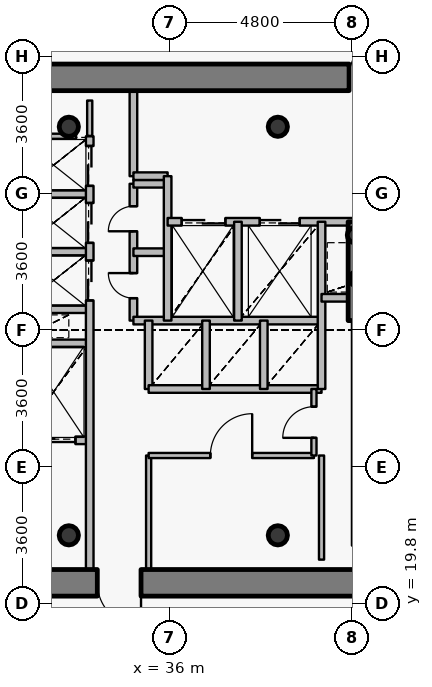
"""IFC4 building model, lengths in metres.
Left out: names, types, materials, properties, quantities, classifications, styles, units other than length and angle.
Written with IfcOpenShell. Run it as: python <this file> out.ifc"""

import sys

from ifc_helpers import new_model, si_unit, direction, frame, frame_2d, origin, origin_2d, place, context, subcontext, project, spatial, rectangle, hollow_circle, extrude, source, transform, mapped, element, fill, save


model = new_model("IFC4")
c1 = context("Model", 3, precision=1e-05, world=origin(), true_north=direction((0.0, 1.0)))
c2 = subcontext(c1, "Body", "Model", "MODEL_VIEW")
j1 = project(units=[si_unit("LENGTHUNIT", "METRE"), si_unit("PLANEANGLEUNIT", "RADIAN")], contexts=[c1])
p1 = place(None, origin())
s1 = spatial("IfcSite", under=j1, at=p1, CompositionType="ELEMENT")
p2 = place(p1, origin())
s2 = spatial("IfcBuilding", under=s1, at=p2, CompositionType="ELEMENT")
p3 = place(p2, frame((0.0, 0.0, 210.3)))
s3 = spatial("IfcBuildingStorey", under=s2, at=p3, CompositionType="ELEMENT", Elevation=210.3)
for number, where, z_axis, x_axis in (
    (1, (33.35, 21.6, 0.0), (0.0, 0.0, 1.0), (1.0, 0.0, 0.0)),
    (2, (38.85, 21.6, 0.0), (0.0, 0.0, 1.0), (1.0, 0.0, 0.0)),
    (3, (38.85, 32.35, 0.0), (0.0, 0.0, 1.0), (1.0, 0.0, 0.0)),
    (4, (33.35, 32.35, 0.0), (0.0, 0.0, 1.0), (1.0, 0.0, 0.0)),
):
    element("IfcColumn", number, at=place(p3, frame(where, z_axis=z_axis, x_axis=x_axis)), inside=s3, PredefinedType="COLUMN", context=c2, shape_type="SweptSolid", body=[
        extrude(hollow_circle(Radius=0.254, WallThickness=0.02, at=origin_2d()), origin(), (0.0, 0.0, 1.0), 3.75),
    ])
for number, where, z_axis, x_axis in (
    (5, (40.95, 28.35, 0.0), (0.0, 0.0, 1.0), (1.0, 0.0, 0.0)),
    (6, (40.88, 29.5, 0.0), (0.0, 0.0, 1.0), (1.0, 0.0, 0.0)),
):
    element("IfcColumn", number, at=place(p3, frame(where, z_axis=z_axis, x_axis=x_axis)), inside=s3, PredefinedType="COLUMN", context=c2, shape_type="SweptSolid", body=[
        extrude(hollow_circle(Radius=0.203, WallThickness=0.016, at=origin_2d()), origin(), (0.0, 0.0, 1.0), 3.75),
    ])
p4 = place(p3, frame((27.05, 33.65, 0.0), z_axis=(0.0, 0.0, 1.0), x_axis=(1.0, 0.0, 0.0)))
e7 = element("IfcWall", 7, at=p4, inside=s3, PredefinedType="SHEAR", context=c2, shape_type="SweptSolid", body=[
    extrude(rectangle(XDim=17.9, YDim=0.7, at=frame_2d((8.95, 0.0))), origin(), (0.0, 0.0, 1.0), 3.05),
])
p5 = place(p4, frame((13.675, 0.0, 0.0)))
e8 = element("IfcOpeningElement", 8, at=p5, cuts=e7, PredefinedType="OPENING", context=c2, shape_type="SweptSolid", body=[
    extrude(rectangle(XDim=1.15, YDim=2.15, at=origin_2d()), frame((0.575, 0.36, 1.075), z_axis=(0.0, -1.0, 0.0), x_axis=(1.0, 0.0, 0.0)), (0.0, 0.0, 1.0), 0.72),
])
p6 = place(p3, frame((44.95, 20.35, 0.0), z_axis=(0.0, 0.0, 1.0), x_axis=(-1.0, 0.0, 0.0)))
e9 = element("IfcWall", 9, at=p6, inside=s3, PredefinedType="SHEAR", context=c2, shape_type="SweptSolid", body=[
    extrude(rectangle(XDim=17.9, YDim=0.7, at=frame_2d((8.95, 0.0))), origin(), (0.0, 0.0, 1.0), 3.05),
])
p7 = place(p6, frame((9.7, 0.0, 0.0)))
e10 = element("IfcOpeningElement", 10, at=p7, cuts=e9, PredefinedType="OPENING", context=c2, shape_type="SweptSolid", body=[
    extrude(rectangle(XDim=1.15, YDim=2.15, at=origin_2d()), frame((0.575, 0.36, 1.075), z_axis=(0.0, -1.0, 0.0), x_axis=(1.0, 0.0, 0.0)), (0.0, 0.0, 1.0), 0.72),
])
p8 = place(p3, frame((40.9, 27.25, 0.0), z_axis=(0.0, 0.0, 1.0), x_axis=(0.0, 1.0, 0.0)))
e11 = element("IfcWall", 11, at=p8, inside=s3, PredefinedType="SHEAR", context=c2, shape_type="SweptSolid", body=[
    extrude(rectangle(XDim=2.6, YDim=0.4, at=frame_2d((1.3, 0.0))), origin(), (0.0, 0.0, 1.0), 3.1),
])
p9 = place(p3, frame((32.0, 24.1, 0.0), z_axis=(0.0, 0.0, 1.0), x_axis=(1.0, 0.0, 0.0)))
e12 = element("IfcWall", 12, at=p9, inside=s3, PredefinedType="PARTITIONING", context=c2, shape_type="SweptSolid", body=[
    extrude(rectangle(XDim=1.9, YDim=0.2, at=frame_2d((0.95, 0.0))), origin(), (0.0, 0.0, 1.0), 3.085),
])
p10 = place(p9, frame((0.375, 0.0, 0.0)))
e13 = element("IfcOpeningElement", 13, at=p10, cuts=e12, PredefinedType="OPENING", context=c2, shape_type="SweptSolid", body=[
    extrude(rectangle(XDim=1.15, YDim=2.15, at=origin_2d()), frame((0.575, 0.11, 1.075), z_axis=(0.0, -1.0, 0.0), x_axis=(1.0, 0.0, 0.0)), (0.0, 0.0, 1.0), 0.22),
])
for number, where, z_axis, x_axis in (
    (14, (32.0, 26.65, 0.0), (0.0, 0.0, 1.0), (1.0, 0.0, 0.0)),
    (15, (32.0, 27.55, 0.0), (0.0, 0.0, 1.0), (1.0, 0.0, 0.0)),
    (16, (32.0, 29.06, 0.0), (0.0, 0.0, 1.0), (1.0, 0.0, 0.0)),
    (17, (32.0, 30.58, 0.0), (0.0, 0.0, 1.0), (1.0, 0.0, 0.0)),
):
    element("IfcWall", number, at=place(p3, frame(where, z_axis=z_axis, x_axis=x_axis)), inside=s3, PredefinedType="PARTITIONING", context=c2, shape_type="SweptSolid", body=[
        extrude(rectangle(XDim=1.9, YDim=0.2, at=frame_2d((0.95, 0.0))), origin(), (0.0, 0.0, 1.0), 3.085),
    ])
p11 = place(p3, frame((33.9, 20.7, 0.0), z_axis=(0.0, 0.0, 1.0), x_axis=(0.0, 1.0, 0.0)))
e18 = element("IfcWall", 18, at=p11, inside=s3, PredefinedType="PARTITIONING", context=c2, shape_type="SweptSolid", body=[
    extrude(rectangle(XDim=11.4, YDim=0.2, at=frame_2d((5.7, 0.0))), origin(), (0.0, 0.0, 1.0), 3.085),
])
p12 = place(p11, frame((7.08, 0.0, 0.0)))
e19 = element("IfcOpeningElement", 19, at=p12, cuts=e18, PredefinedType="OPENING", context=c2, shape_type="SweptSolid", body=[
    extrude(rectangle(XDim=1.05, YDim=2.15, at=origin_2d()), frame((0.525, 0.11, 1.075), z_axis=(0.0, -1.0, 0.0), x_axis=(1.0, 0.0, 0.0)), (0.0, 0.0, 1.0), 0.22),
])
p13 = place(p11, frame((8.595, 0.0, 0.0)))
e20 = element("IfcOpeningElement", 20, at=p13, cuts=e18, PredefinedType="OPENING", context=c2, shape_type="SweptSolid", body=[
    extrude(rectangle(XDim=1.05, YDim=2.15, at=origin_2d()), frame((0.525, 0.11, 1.075), z_axis=(0.0, -1.0, 0.0), x_axis=(1.0, 0.0, 0.0)), (0.0, 0.0, 1.0), 0.22),
])
p14 = place(p11, frame((10.095, 0.0, 0.0)))
e21 = element("IfcOpeningElement", 21, at=p14, cuts=e18, PredefinedType="OPENING", context=c2, shape_type="SweptSolid", body=[
    extrude(rectangle(XDim=1.05, YDim=2.15, at=origin_2d()), frame((0.525, 0.11, 1.075), z_axis=(0.0, -1.0, 0.0), x_axis=(1.0, 0.0, 0.0)), (0.0, 0.0, 1.0), 0.22),
])
p15 = place(p3, frame((35.05, 27.25, 0.0), z_axis=(0.0, 0.0, 1.0), x_axis=(0.0, 1.0, 0.0)))
e22 = element("IfcWall", 22, at=p15, inside=s3, PredefinedType="PARTITIONING", context=c2, shape_type="SweptSolid", body=[
    extrude(rectangle(XDim=3.6, YDim=0.2, at=frame_2d((1.8, 0.0))), origin(), (0.0, 0.0, 1.0), 3.5),
])
p16 = place(p15, frame((0.59, 0.0, 0.0)))
e23 = element("IfcOpeningElement", 23, at=p16, cuts=e22, PredefinedType="OPENING", context=c2, shape_type="SweptSolid", body=[
    extrude(rectangle(XDim=0.66, YDim=2.05, at=origin_2d()), frame((0.33, 0.11, 1.025), z_axis=(0.0, -1.0, 0.0), x_axis=(1.0, 0.0, 0.0)), (0.0, 0.0, 1.0), 0.22),
])
p17 = place(p15, frame((2.35, 0.0, 0.0)))
e24 = element("IfcOpeningElement", 24, at=p17, cuts=e22, PredefinedType="OPENING", context=c2, shape_type="SweptSolid", body=[
    extrude(rectangle(XDim=0.66, YDim=2.05, at=origin_2d()), frame((0.33, 0.11, 1.025), z_axis=(0.0, -1.0, 0.0), x_axis=(1.0, 0.0, 0.0)), (0.0, 0.0, 1.0), 0.22),
])
p18 = place(p3, frame((35.05, 27.25, 0.0), z_axis=(0.0, 0.0, 1.0), x_axis=(1.0, 0.0, 0.0)))
e25 = element("IfcWall", 25, at=p18, inside=s3, PredefinedType="PARTITIONING", context=c2, shape_type="SweptSolid", body=[
    extrude(rectangle(XDim=4.95, YDim=0.2, at=frame_2d((2.475, 0.0))), origin(), (0.0, 0.0, 1.0), 3.085),
])
for number, where, z_axis, x_axis in (
    (26, (35.05, 29.05, 0.0), (0.0, 0.0, 1.0), (1.0, 0.0, 0.0)),
    (27, (35.05, 30.85, 0.0), (0.0, 0.0, 1.0), (1.0, 0.0, 0.0)),
):
    element("IfcWall", number, at=place(p3, frame(where, z_axis=z_axis, x_axis=x_axis)), inside=s3, PredefinedType="PARTITIONING", context=c2, shape_type="SweptSolid", body=[
        extrude(rectangle(XDim=0.9, YDim=0.2, at=frame_2d((0.45, 0.0))), origin(), (0.0, 0.0, 1.0), 3.5),
    ])
p19 = place(p3, frame((35.05, 31.05, 0.0), z_axis=(0.0, 0.0, 1.0), x_axis=(0.0, 1.0, 0.0)))
e28 = element("IfcWall", 28, at=p19, inside=s3, PredefinedType="PARTITIONING", context=c2, shape_type="SweptSolid", body=[
    extrude(rectangle(XDim=2.25, YDim=0.2, at=frame_2d((1.125, 0.0))), origin(), (0.0, 0.0, 1.0), 3.085),
])
p20 = place(p3, frame((35.05, 31.05, 0.0), z_axis=(0.0, 0.0, 1.0), x_axis=(1.0, 0.0, 0.0)))
e29 = element("IfcWall", 29, at=p20, inside=s3, PredefinedType="PARTITIONING", context=c2, shape_type="SweptSolid", body=[
    extrude(rectangle(XDim=0.9, YDim=0.2, at=frame_2d((0.45, 0.0))), origin(), (0.0, 0.0, 1.0), 3.5),
])
p21 = place(p3, frame((35.45, 20.7, 0.0), z_axis=(0.0, 0.0, 1.0), x_axis=(0.0, 1.0, 0.0)))
e30 = element("IfcWall", 30, at=p21, inside=s3, PredefinedType="PARTITIONING", context=c2, shape_type="SweptSolid", body=[
    extrude(rectangle(XDim=3.0, YDim=0.135, at=frame_2d((1.5, 0.0))), origin(), (0.0, 0.0, 1.0), 3.085),
])
p22 = place(p3, frame((35.45, 23.7, 0.0), z_axis=(0.0, 0.0, 1.0), x_axis=(1.0, 0.0, 0.0)))
e31 = element("IfcWall", 31, at=p22, inside=s3, PredefinedType="PARTITIONING", context=c2, shape_type="SweptSolid", body=[
    extrude(rectangle(XDim=4.35, YDim=0.135, at=frame_2d((2.175, 0.0))), origin(), (0.0, 0.0, 1.0), 3.085),
])
p23 = place(p22, frame((1.625, 0.0, 0.0)))
e32 = element("IfcOpeningElement", 32, at=p23, cuts=e31, PredefinedType="OPENING", context=c2, shape_type="SweptSolid", body=[
    extrude(rectangle(XDim=1.1, YDim=2.15, at=origin_2d()), frame((0.55, 0.078, 1.075), z_axis=(0.0, -1.0, 0.0), x_axis=(1.0, 0.0, 0.0)), (0.0, 0.0, 1.0), 0.155),
])
p24 = place(p3, frame((35.45, 25.45, 0.0), z_axis=(0.0, 0.0, 1.0), x_axis=(0.0, 1.0, 0.0)))
e33 = element("IfcWall", 33, at=p24, inside=s3, PredefinedType="PARTITIONING", context=c2, shape_type="SweptSolid", body=[
    extrude(rectangle(XDim=1.8, YDim=0.2, at=frame_2d((0.9, 0.0))), origin(), (0.0, 0.0, 1.0), 3.5),
])
p25 = place(p3, frame((35.45, 25.45, 0.0), z_axis=(0.0, 0.0, 1.0), x_axis=(1.0, 0.0, 0.0)))
e34 = element("IfcWall", 34, at=p25, inside=s3, PredefinedType="PARTITIONING", context=c2, shape_type="SweptSolid", body=[
    extrude(rectangle(XDim=4.55, YDim=0.2, at=frame_2d((2.275, 0.0))), origin(), (0.0, 0.0, 1.0), 3.085),
])
p26 = place(p3, frame((35.95, 27.25, 0.0), z_axis=(0.0, 0.0, 1.0), x_axis=(0.0, 1.0, 0.0)))
e35 = element("IfcWall", 35, at=p26, inside=s3, PredefinedType="PARTITIONING", context=c2, shape_type="SweptSolid", body=[
    extrude(rectangle(XDim=3.8, YDim=0.2, at=frame_2d((1.9, 0.0))), origin(), (0.0, 0.0, 1.0), 3.5),
])
p27 = place(p3, frame((35.95, 29.85, 0.0), z_axis=(0.0, 0.0, 1.0), x_axis=(1.0, 0.0, 0.0)))
e36 = element("IfcWall", 36, at=p27, inside=s3, PredefinedType="PARTITIONING", context=c2, shape_type="SweptSolid", body=[
    extrude(rectangle(XDim=8.49, YDim=0.2, at=frame_2d((4.245, 0.0))), origin(), (0.0, 0.0, 1.0), 3.085),
])
p28 = place(p27, frame((6.1, 0.0, 0.0)))
e37 = element("IfcOpeningElement", 37, at=p28, cuts=e36, PredefinedType="OPENING", context=c2, shape_type="SweptSolid", body=[
    extrude(rectangle(XDim=1.2, YDim=2.15, at=origin_2d()), frame((0.6, 0.11, 1.075), z_axis=(0.0, -1.0, 0.0), x_axis=(1.0, 0.0, 0.0)), (0.0, 0.0, 1.0), 0.22),
])
p29 = place(p27, frame((0.37, 0.0, 0.0)))
e38 = element("IfcOpeningElement", 38, at=p29, cuts=e36, PredefinedType="OPENING", context=c2, shape_type="SweptSolid", body=[
    extrude(rectangle(XDim=1.15, YDim=2.15, at=origin_2d()), frame((0.575, 0.11, 1.075), z_axis=(0.0, -1.0, 0.0), x_axis=(1.0, 0.0, 0.0)), (0.0, 0.0, 1.0), 0.22),
])
p30 = place(p27, frame((2.425, 0.0, 0.0)))
e39 = element("IfcOpeningElement", 39, at=p30, cuts=e36, PredefinedType="OPENING", context=c2, shape_type="SweptSolid", body=[
    extrude(rectangle(XDim=1.05, YDim=2.15, at=origin_2d()), frame((0.525, 0.11, 1.075), z_axis=(0.0, -1.0, 0.0), x_axis=(1.0, 0.0, 0.0)), (0.0, 0.0, 1.0), 0.22),
])
p31 = place(p3, frame((36.96, 25.45, 0.0), z_axis=(0.0, 0.0, 1.0), x_axis=(0.0, 1.0, 0.0)))
e40 = element("IfcWall", 40, at=p31, inside=s3, PredefinedType="PARTITIONING", context=c2, shape_type="SweptSolid", body=[
    extrude(rectangle(XDim=1.8, YDim=0.2, at=frame_2d((0.9, 0.0))), origin(), (0.0, 0.0, 1.0), 3.5),
])
p32 = place(p3, frame((37.8, 27.25, 0.0), z_axis=(0.0, 0.0, 1.0), x_axis=(0.0, 1.0, 0.0)))
e41 = element("IfcWall", 41, at=p32, inside=s3, PredefinedType="PARTITIONING", context=c2, shape_type="SweptSolid", body=[
    extrude(rectangle(XDim=2.6, YDim=0.2, at=frame_2d((1.3, 0.0))), origin(), (0.0, 0.0, 1.0), 3.5),
])
p33 = place(p3, frame((38.48, 25.45, 0.0), z_axis=(0.0, 0.0, 1.0), x_axis=(0.0, 1.0, 0.0)))
e42 = element("IfcWall", 42, at=p33, inside=s3, PredefinedType="PARTITIONING", context=c2, shape_type="SweptSolid", body=[
    extrude(rectangle(XDim=1.8, YDim=0.2, at=frame_2d((0.9, 0.0))), origin(), (0.0, 0.0, 1.0), 3.5),
])
p34 = place(p3, frame((39.8, 23.7, 0.0), z_axis=(0.0, 0.0, 1.0), x_axis=(0.0, 1.0, 0.0)))
e43 = element("IfcWall", 43, at=p34, inside=s3, PredefinedType="PARTITIONING", context=c2, shape_type="SweptSolid", body=[
    extrude(rectangle(XDim=1.75, YDim=0.135, at=frame_2d((0.875, 0.0))), origin(), (0.0, 0.0, 1.0), 3.5),
])
p35 = place(p34, frame((0.465, 0.0, 0.0)))
e44 = element("IfcOpeningElement", 44, at=p35, cuts=e43, PredefinedType="OPENING", context=c2, shape_type="SweptSolid", body=[
    extrude(rectangle(XDim=0.82, YDim=2.1, at=origin_2d()), frame((0.41, 0.078, 1.05), z_axis=(0.0, -1.0, 0.0), x_axis=(1.0, 0.0, 0.0)), (0.0, 0.0, 1.0), 0.155),
])
p36 = place(p3, frame((40.0, 25.45, 0.0), z_axis=(0.0, 0.0, 1.0), x_axis=(0.0, 1.0, 0.0)))
e45 = element("IfcWall", 45, at=p36, inside=s3, PredefinedType="PARTITIONING", context=c2, shape_type="SweptSolid", body=[
    extrude(rectangle(XDim=4.4, YDim=0.2, at=frame_2d((2.2, 0.0))), origin(), (0.0, 0.0, 1.0), 3.5),
])
p37 = place(p3, frame((40.0, 27.85, 0.0), z_axis=(0.0, 0.0, 1.0), x_axis=(1.0, 0.0, 0.0)))
e46 = element("IfcWall", 46, at=p37, inside=s3, PredefinedType="PARTITIONING", context=c2, shape_type="SweptSolid", body=[
    extrude(rectangle(XDim=0.9, YDim=0.2, at=frame_2d((0.45, 0.0))), origin(), (0.0, 0.0, 1.0), 3.5),
])
p38 = place(p3, frame((40.9, 21.33, 0.0), z_axis=(0.0, 0.0, 1.0), x_axis=(0.0, 1.0, 0.0)))
e47 = element("IfcWall", 47, at=p38, inside=s3, PredefinedType="PARTITIONING", context=c2, shape_type="SweptSolid", body=[
    extrude(rectangle(XDim=5.91, YDim=0.2, at=frame_2d((2.955, 0.0))), origin(), (0.0, 0.0, 1.0), 3.035),
])
p39 = place(p3, frame((32.36, 32.1, 0.0), z_axis=(0.0, 0.0, 1.0), x_axis=(1.0, 0.0, 0.0)))
e48 = element("IfcWall", 48, at=p39, inside=s3, PredefinedType="PARTITIONING", context=c2, shape_type="SweptSolid", body=[
    extrude(rectangle(XDim=1.18, YDim=0.135, at=frame_2d((0.59, 0.0))), origin(), (0.0, 0.0, 1.0), 3.085),
])
p40 = place(p3, frame((40.0, 23.7, 0.0), z_axis=(0.0, 0.0, 1.0), x_axis=(0.0, -1.0, 0.0)))
e49 = element("IfcWall", 49, at=p40, inside=s3, PredefinedType="PARTITIONING", context=c2, shape_type="SweptSolid", body=[
    extrude(rectangle(XDim=2.74, YDim=0.135, at=frame_2d((1.37, 0.0))), origin(), (0.0, 0.0, 1.0), 3.035),
])
p41 = place(p3, frame((33.9, 32.11, 0.0), z_axis=(0.0, 0.0, 1.0), x_axis=(0.0, 1.0, 0.0)))
e50 = element("IfcWall", 50, at=p41, inside=s3, PredefinedType="PARTITIONING", context=c2, shape_type="SweptSolid", body=[
    extrude(rectangle(XDim=0.93, YDim=0.135, at=frame_2d((0.465, 0.0))), origin(), (0.0, 0.0, 1.0), 3.085),
])
m1 = source(origin(), c2, "Body", "SweptSolid", [
    extrude(rectangle(XDim=1.15, YDim=2.15, at=origin_2d()), frame((0.575, 0.025, 1.075), z_axis=(0.0, -1.0, 0.0), x_axis=(1.0, 0.0, 0.0)), (0.0, 0.0, 1.0), 0.05),
])
p42 = place(p5, origin())
e51 = element("IfcDoor", 51, at=p42, inside=s3, OperationType="SINGLE_SWING_RIGHT", PredefinedType="DOOR", context=c2, shape_type="MappedRepresentation", body=[
    mapped(m1, transform((0.0, 0.0, 0.0), x_axis=(1.0, 0.0, 0.0), y_axis=(0.0, 1.0, 0.0), z_axis=(0.0, 0.0, 1.0), scale=1.0)),
])
fill(e8, e51)
p43 = place(p7, origin())
e52 = element("IfcDoor", 52, at=p43, inside=s3, OperationType="SINGLE_SWING_LEFT", PredefinedType="DOOR", context=c2, shape_type="MappedRepresentation", body=[
    mapped(m1, transform((0.0, 0.0, 0.0), x_axis=(1.0, 0.0, 0.0), y_axis=(0.0, 1.0, 0.0), z_axis=(0.0, 0.0, 1.0), scale=1.0)),
])
fill(e10, e52)
m2 = source(origin(), c2, "Body", "SweptSolid", [
    extrude(rectangle(XDim=1.15, YDim=2.15, at=origin_2d()), frame((0.575, 0.025, 1.075), z_axis=(0.0, -1.0, 0.0), x_axis=(1.0, 0.0, 0.0)), (0.0, 0.0, 1.0), 0.05),
])
p44 = place(p29, origin())
e53 = element("IfcDoor", 53, at=p44, inside=s3, OperationType="DOUBLE_DOOR_SLIDING", PredefinedType="USERDEFINED", context=c2, shape_type="MappedRepresentation", body=[
    mapped(m2, transform((0.0, 0.0, 0.0), x_axis=(1.0, 0.0, 0.0), y_axis=(0.0, 1.0, 0.0), z_axis=(0.0, 0.0, 1.0), scale=1.0)),
])
fill(e38, e53)
p45 = place(p10, origin())
e54 = element("IfcDoor", 54, at=p45, inside=s3, OperationType="DOUBLE_DOOR_SLIDING", PredefinedType="USERDEFINED", context=c2, shape_type="MappedRepresentation", body=[
    mapped(m2, transform((0.0, 0.0, 0.0), x_axis=(1.0, 0.0, 0.0), y_axis=(0.0, 1.0, 0.0), z_axis=(0.0, 0.0, 1.0), scale=1.0)),
])
fill(e13, e54)
m3 = source(origin(), c2, "Body", "SweptSolid", [
    extrude(rectangle(XDim=1.05, YDim=2.15, at=origin_2d()), frame((0.525, 0.025, 1.075), z_axis=(0.0, -1.0, 0.0), x_axis=(1.0, 0.0, 0.0)), (0.0, 0.0, 1.0), 0.05),
])
p46 = place(p30, origin())
e55 = element("IfcDoor", 55, at=p46, inside=s3, OperationType="DOUBLE_DOOR_SLIDING", PredefinedType="USERDEFINED", context=c2, shape_type="MappedRepresentation", body=[
    mapped(m3, transform((0.0, 0.0, 0.0), x_axis=(1.0, 0.0, 0.0), y_axis=(0.0, 1.0, 0.0), z_axis=(0.0, 0.0, 1.0), scale=1.0)),
])
fill(e39, e55)
p47 = place(p12, origin())
e56 = element("IfcDoor", 56, at=p47, inside=s3, OperationType="DOUBLE_DOOR_SLIDING", PredefinedType="USERDEFINED", context=c2, shape_type="MappedRepresentation", body=[
    mapped(m3, transform((0.0, 0.0, 0.0), x_axis=(1.0, 0.0, 0.0), y_axis=(0.0, 1.0, 0.0), z_axis=(0.0, 0.0, 1.0), scale=1.0)),
])
fill(e19, e56)
p48 = place(p13, origin())
e57 = element("IfcDoor", 57, at=p48, inside=s3, OperationType="DOUBLE_DOOR_SLIDING", PredefinedType="USERDEFINED", context=c2, shape_type="MappedRepresentation", body=[
    mapped(m3, transform((0.0, 0.0, 0.0), x_axis=(1.0, 0.0, 0.0), y_axis=(0.0, 1.0, 0.0), z_axis=(0.0, 0.0, 1.0), scale=1.0)),
])
fill(e20, e57)
p49 = place(p14, origin())
e58 = element("IfcDoor", 58, at=p49, inside=s3, OperationType="DOUBLE_DOOR_SLIDING", PredefinedType="USERDEFINED", context=c2, shape_type="MappedRepresentation", body=[
    mapped(m3, transform((0.0, 0.0, 0.0), x_axis=(1.0, 0.0, 0.0), y_axis=(0.0, 1.0, 0.0), z_axis=(0.0, 0.0, 1.0), scale=1.0)),
])
fill(e21, e58)
m4 = source(origin(), c2, "Body", "SweptSolid", [
    extrude(rectangle(XDim=0.66, YDim=2.05, at=origin_2d()), frame((0.33, 0.025, 1.025), z_axis=(0.0, -1.0, 0.0), x_axis=(1.0, 0.0, 0.0)), (0.0, 0.0, 1.0), 0.05),
])
p50 = place(p16, origin())
e59 = element("IfcDoor", 59, at=p50, inside=s3, OperationType="SINGLE_SWING_RIGHT", PredefinedType="USERDEFINED", context=c2, shape_type="MappedRepresentation", body=[
    mapped(m4, transform((0.0, 0.0, 0.0), x_axis=(1.0, 0.0, 0.0), y_axis=(0.0, 1.0, 0.0), z_axis=(0.0, 0.0, 1.0), scale=1.0)),
])
fill(e23, e59)
p51 = place(p17, origin())
e60 = element("IfcDoor", 60, at=p51, inside=s3, OperationType="SINGLE_SWING_LEFT", PredefinedType="USERDEFINED", context=c2, shape_type="MappedRepresentation", body=[
    mapped(m4, transform((0.0, 0.0, 0.0), x_axis=(1.0, 0.0, 0.0), y_axis=(0.0, 1.0, 0.0), z_axis=(0.0, 0.0, 1.0), scale=1.0)),
])
fill(e24, e60)
m5 = source(origin(), c2, "Body", "SweptSolid", [
    extrude(rectangle(XDim=1.1, YDim=2.15, at=origin_2d()), frame((0.55, 0.025, 1.075), z_axis=(0.0, -1.0, 0.0), x_axis=(1.0, 0.0, 0.0)), (0.0, 0.0, 1.0), 0.05),
])
p52 = place(p23, origin())
e61 = element("IfcDoor", 61, at=p52, inside=s3, OperationType="SINGLE_SWING_RIGHT", PredefinedType="DOOR", context=c2, shape_type="MappedRepresentation", body=[
    mapped(m5, transform((0.0, 0.0, 0.0), x_axis=(1.0, 0.0, 0.0), y_axis=(0.0, 1.0, 0.0), z_axis=(0.0, 0.0, 1.0), scale=1.0)),
])
fill(e32, e61)
m6 = source(origin(), c2, "Body", "SweptSolid", [
    extrude(rectangle(XDim=0.82, YDim=2.1, at=origin_2d()), frame((0.41, 0.025, 1.05), z_axis=(0.0, -1.0, 0.0), x_axis=(1.0, 0.0, 0.0)), (0.0, 0.0, 1.0), 0.05),
])
p53 = place(p35, origin())
e62 = element("IfcDoor", 62, at=p53, inside=s3, OperationType="SINGLE_SWING_LEFT", PredefinedType="DOOR", context=c2, shape_type="MappedRepresentation", body=[
    mapped(m6, transform((0.0, 0.0, 0.0), x_axis=(1.0, 0.0, 0.0), y_axis=(0.0, 1.0, 0.0), z_axis=(0.0, 0.0, 1.0), scale=1.0)),
])
fill(e44, e62)
save(model, sys.argv[1])
